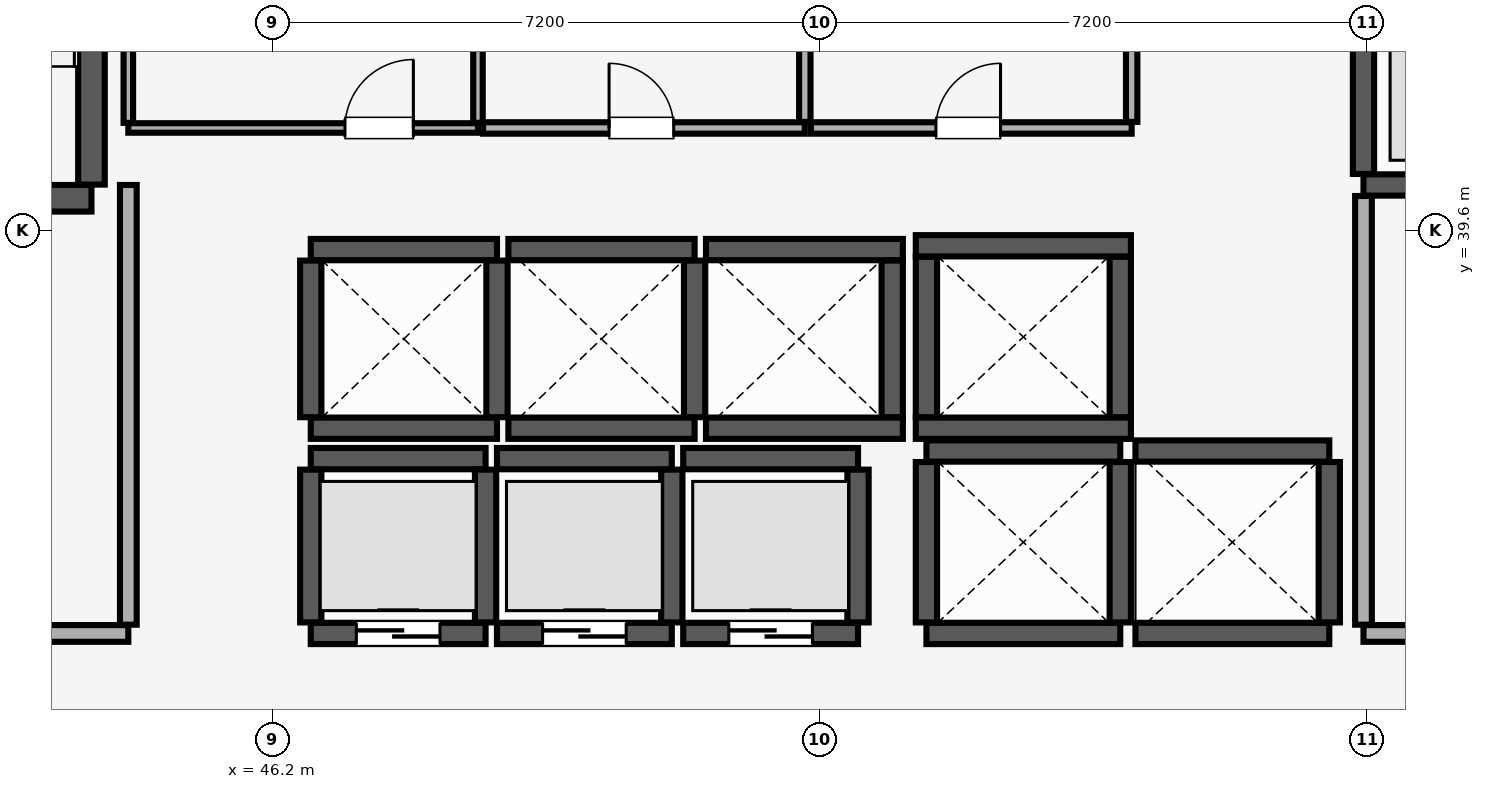
"""IFC4 building model, lengths in metres.
Left out: names, types, materials, properties, quantities, classifications, styles, units other than length and angle.
Written with IfcOpenShell. Run it as: python <this file> out.ifc"""

import sys

from ifc_helpers import new_model, si_unit, direction, frame, frame_2d, origin, place, context, subcontext, project, spatial, rectangle, extrude, element, fill, save


model = new_model("IFC4")
c1 = context("Model", 3, precision=1e-05, world=origin(), true_north=direction((0.0, 1.0)))
c2 = subcontext(c1, "Body", "Model", "MODEL_VIEW")
j1 = project(units=[si_unit("LENGTHUNIT", "METRE"), si_unit("PLANEANGLEUNIT", "RADIAN")], contexts=[c1])
p1 = place(None, origin())
s1 = spatial("IfcSite", under=j1, at=p1, CompositionType="ELEMENT")
p2 = place(p1, origin())
s2 = spatial("IfcBuilding", under=s1, at=p2, CompositionType="ELEMENT")
p3 = place(p2, frame((0.0, 0.0, 135.35)))
s3 = spatial("IfcBuildingStorey", under=s2, at=p3, CompositionType="ELEMENT", Elevation=135.35)
p4 = place(p3, frame((40.185, 40.025, 0.0), z_axis=(0.0, 0.0, 1.0), x_axis=(1.0, 0.0, 0.0)))
e1 = element("IfcWall", 1, at=p4, inside=s3, PredefinedType="SHEAR", context=c2, shape_type="SweptSolid", body=[
    extrude(rectangle(XDim=3.63, YDim=0.35, at=frame_2d((1.815, 0.0))), origin(), (0.0, 0.0, 1.0), 3.56),
])
p5 = place(p4, frame((1.24, 0.0, 0.0)))
e2 = element("IfcOpeningElement", 2, at=p5, cuts=e1, PredefinedType="OPENING", context=c2, shape_type="SweptSolid", body=[
    extrude(rectangle(XDim=1.15, YDim=2.15, at=frame_2d((0.575, 1.075))), frame((0.0, 0.185, 0.0), z_axis=(0.0, -1.0, 0.0), x_axis=(1.0, 0.0, 0.0)), (0.0, 0.0, 1.0), 0.37),
])
p6 = place(p3, frame((43.815, 40.205, 0.0), z_axis=(0.0, 0.0, 1.0), x_axis=(0.0, 1.0, 0.0)))
e3 = element("IfcWall", 3, at=p6, inside=s3, PredefinedType="SHEAR", context=c2, shape_type="SweptSolid", body=[
    extrude(rectangle(XDim=8.09, YDim=0.35, at=frame_2d((4.045, 0.0))), origin(), (0.0, 0.0, 1.0), 3.56),
])
p7 = place(p3, frame((46.7, 34.3, 0.0), z_axis=(0.0, 0.0, 1.0), x_axis=(1.0, 0.0, 0.0)))
e4 = element("IfcWall", 4, at=p7, inside=s3, PredefinedType="SHEAR", context=c2, shape_type="SweptSolid", body=[
    extrude(rectangle(XDim=2.3, YDim=0.28, at=frame_2d((1.15, 0.0))), origin(), (0.0, 0.0, 1.0), 3.56),
])
p8 = place(p7, frame((0.6, 0.0, 0.0)))
e5 = element("IfcOpeningElement", 5, at=p8, cuts=e4, PredefinedType="OPENING", context=c2, shape_type="SweptSolid", body=[
    extrude(rectangle(XDim=1.1, YDim=2.2, at=frame_2d((0.55, 1.1))), frame((0.0, 0.15, 0.0), z_axis=(0.0, -1.0, 0.0), x_axis=(1.0, 0.0, 0.0)), (0.0, 0.0, 1.0), 0.3),
])
p9 = place(p3, frame((46.7, 36.6, 0.0), z_axis=(0.0, 0.0, 1.0), x_axis=(1.0, 0.0, 0.0)))
e6 = element("IfcWall", 6, at=p9, inside=s3, PredefinedType="SHEAR", context=c2, shape_type="SweptSolid", body=[
    extrude(rectangle(XDim=2.3, YDim=0.28, at=frame_2d((1.15, 0.0))), origin(), (0.0, 0.0, 1.0), 3.56),
])
for number, where, z_axis, x_axis in (
    (7, (46.7, 34.445, 0.0), (0.0, 0.0, 1.0), (0.0, 1.0, 0.0)),
    (8, (49.0, 34.445, 0.0), (0.0, 0.0, 1.0), (0.0, 1.0, 0.0)),
):
    element("IfcWall", number, at=place(p3, frame(where, z_axis=z_axis, x_axis=x_axis)), inside=s3, PredefinedType="SHEAR", context=c2, shape_type="SweptSolid", body=[
        extrude(rectangle(XDim=2.01, YDim=0.28, at=frame_2d((1.005, 0.0))), origin(), (0.0, 0.0, 1.0), 3.56),
    ])
p10 = place(p3, frame((49.15, 34.3, 0.0), z_axis=(0.0, 0.0, 1.0), x_axis=(1.0, 0.0, 0.0)))
e9 = element("IfcWall", 9, at=p10, inside=s3, PredefinedType="SHEAR", context=c2, shape_type="SweptSolid", body=[
    extrude(rectangle(XDim=2.3, YDim=0.28, at=frame_2d((1.15, 0.0))), origin(), (0.0, 0.0, 1.0), 3.56),
])
p11 = place(p10, frame((0.6, 0.0, 0.0)))
e10 = element("IfcOpeningElement", 10, at=p11, cuts=e9, PredefinedType="OPENING", context=c2, shape_type="SweptSolid", body=[
    extrude(rectangle(XDim=1.1, YDim=2.2, at=frame_2d((0.55, 1.1))), frame((0.0, 0.15, 0.0), z_axis=(0.0, -1.0, 0.0), x_axis=(1.0, 0.0, 0.0)), (0.0, 0.0, 1.0), 0.3),
])
p12 = place(p3, frame((49.15, 36.6, 0.0), z_axis=(0.0, 0.0, 1.0), x_axis=(1.0, 0.0, 0.0)))
e11 = element("IfcWall", 11, at=p12, inside=s3, PredefinedType="SHEAR", context=c2, shape_type="SweptSolid", body=[
    extrude(rectangle(XDim=2.3, YDim=0.28, at=frame_2d((1.15, 0.0))), origin(), (0.0, 0.0, 1.0), 3.56),
])
p13 = place(p3, frame((51.45, 34.445, 0.0), z_axis=(0.0, 0.0, 1.0), x_axis=(0.0, 1.0, 0.0)))
e12 = element("IfcWall", 12, at=p13, inside=s3, PredefinedType="SHEAR", context=c2, shape_type="SweptSolid", body=[
    extrude(rectangle(XDim=2.01, YDim=0.28, at=frame_2d((1.005, 0.0))), origin(), (0.0, 0.0, 1.0), 3.56),
])
p14 = place(p3, frame((51.6, 34.3, 0.0), z_axis=(0.0, 0.0, 1.0), x_axis=(1.0, 0.0, 0.0)))
e13 = element("IfcWall", 13, at=p14, inside=s3, PredefinedType="SHEAR", context=c2, shape_type="SweptSolid", body=[
    extrude(rectangle(XDim=2.3, YDim=0.28, at=frame_2d((1.15, 0.0))), origin(), (0.0, 0.0, 1.0), 3.56),
])
p15 = place(p14, frame((0.6, 0.0, 0.0)))
e14 = element("IfcOpeningElement", 14, at=p15, cuts=e13, PredefinedType="OPENING", context=c2, shape_type="SweptSolid", body=[
    extrude(rectangle(XDim=1.1, YDim=2.2, at=frame_2d((0.55, 1.1))), frame((0.0, 0.15, 0.0), z_axis=(0.0, -1.0, 0.0), x_axis=(1.0, 0.0, 0.0)), (0.0, 0.0, 1.0), 0.3),
])
p16 = place(p3, frame((51.6, 36.6, 0.0), z_axis=(0.0, 0.0, 1.0), x_axis=(1.0, 0.0, 0.0)))
e15 = element("IfcWall", 15, at=p16, inside=s3, PredefinedType="SHEAR", context=c2, shape_type="SweptSolid", body=[
    extrude(rectangle(XDim=2.3, YDim=0.28, at=frame_2d((1.15, 0.0))), origin(), (0.0, 0.0, 1.0), 3.56),
])
p17 = place(p3, frame((53.9, 34.445, 0.0), z_axis=(0.0, 0.0, 1.0), x_axis=(0.0, 1.0, 0.0)))
e16 = element("IfcWall", 16, at=p17, inside=s3, PredefinedType="SHEAR", context=c2, shape_type="SweptSolid", body=[
    extrude(rectangle(XDim=2.01, YDim=0.28, at=frame_2d((1.005, 0.0))), origin(), (0.0, 0.0, 1.0), 3.56),
])
for number, where, z_axis, x_axis in (
    (17, (46.7, 37.0, 0.0), (0.0, 0.0, 1.0), (1.0, 0.0, 0.0)),
    (18, (46.7, 39.35, 0.0), (0.0, 0.0, 1.0), (1.0, 0.0, 0.0)),
):
    element("IfcWall", number, at=place(p3, frame(where, z_axis=z_axis, x_axis=x_axis)), inside=s3, PredefinedType="SHEAR", context=c2, shape_type="SweptSolid", body=[
        extrude(rectangle(XDim=2.45, YDim=0.28, at=frame_2d((1.225, 0.0))), origin(), (0.0, 0.0, 1.0), 3.56),
    ])
for number, where, z_axis, x_axis in (
    (19, (46.7, 37.145, 0.0), (0.0, 0.0, 1.0), (0.0, 1.0, 0.0)),
    (20, (49.15, 37.145, 0.0), (0.0, 0.0, 1.0), (0.0, 1.0, 0.0)),
):
    element("IfcWall", number, at=place(p3, frame(where, z_axis=z_axis, x_axis=x_axis)), inside=s3, PredefinedType="SHEAR", context=c2, shape_type="SweptSolid", body=[
        extrude(rectangle(XDim=2.06, YDim=0.28, at=frame_2d((1.03, 0.0))), origin(), (0.0, 0.0, 1.0), 3.56),
    ])
for number, where, z_axis, x_axis in (
    (21, (49.3, 37.0, 0.0), (0.0, 0.0, 1.0), (1.0, 0.0, 0.0)),
    (22, (49.3, 39.35, 0.0), (0.0, 0.0, 1.0), (1.0, 0.0, 0.0)),
):
    element("IfcWall", number, at=place(p3, frame(where, z_axis=z_axis, x_axis=x_axis)), inside=s3, PredefinedType="SHEAR", context=c2, shape_type="SweptSolid", body=[
        extrude(rectangle(XDim=2.45, YDim=0.28, at=frame_2d((1.225, 0.0))), origin(), (0.0, 0.0, 1.0), 3.56),
    ])
p18 = place(p3, frame((51.75, 37.145, 0.0), z_axis=(0.0, 0.0, 1.0), x_axis=(0.0, 1.0, 0.0)))
e23 = element("IfcWall", 23, at=p18, inside=s3, PredefinedType="SHEAR", context=c2, shape_type="SweptSolid", body=[
    extrude(rectangle(XDim=2.06, YDim=0.28, at=frame_2d((1.03, 0.0))), origin(), (0.0, 0.0, 1.0), 3.56),
])
for number, where, z_axis, x_axis in (
    (24, (51.9, 37.0, 0.0), (0.0, 0.0, 1.0), (1.0, 0.0, 0.0)),
    (25, (51.9, 39.35, 0.0), (0.0, 0.0, 1.0), (1.0, 0.0, 0.0)),
):
    element("IfcWall", number, at=place(p3, frame(where, z_axis=z_axis, x_axis=x_axis)), inside=s3, PredefinedType="SHEAR", context=c2, shape_type="SweptSolid", body=[
        extrude(rectangle(XDim=2.59, YDim=0.28, at=frame_2d((1.295, 0.0))), origin(), (0.0, 0.0, 1.0), 3.56),
    ])
p19 = place(p3, frame((54.35, 37.145, 0.0), z_axis=(0.0, 0.0, 1.0), x_axis=(0.0, 1.0, 0.0)))
e26 = element("IfcWall", 26, at=p19, inside=s3, PredefinedType="SHEAR", context=c2, shape_type="SweptSolid", body=[
    extrude(rectangle(XDim=2.06, YDim=0.28, at=frame_2d((1.03, 0.0))), origin(), (0.0, 0.0, 1.0), 3.56),
])
for number, where, z_axis, x_axis in (
    (27, (54.8, 34.3, 0.0), (0.0, 0.0, 1.0), (1.0, 0.0, 0.0)),
    (28, (54.8, 36.7, 0.0), (0.0, 0.0, 1.0), (1.0, 0.0, 0.0)),
):
    element("IfcWall", number, at=place(p3, frame(where, z_axis=z_axis, x_axis=x_axis)), inside=s3, PredefinedType="SHEAR", context=c2, shape_type="SweptSolid", body=[
        extrude(rectangle(XDim=2.55, YDim=0.28, at=frame_2d((1.275, 0.0))), origin(), (0.0, 0.0, 1.0), 3.56),
    ])
for number, where, z_axis, x_axis in (
    (29, (54.8, 34.445, 0.0), (0.0, 0.0, 1.0), (0.0, 1.0, 0.0)),
    (30, (57.35, 34.445, 0.0), (0.0, 0.0, 1.0), (0.0, 1.0, 0.0)),
):
    element("IfcWall", number, at=place(p3, frame(where, z_axis=z_axis, x_axis=x_axis)), inside=s3, PredefinedType="SHEAR", context=c2, shape_type="SweptSolid", body=[
        extrude(rectangle(XDim=2.11, YDim=0.28, at=frame_2d((1.055, 0.0))), origin(), (0.0, 0.0, 1.0), 3.56),
    ])
for number, where, z_axis, x_axis in (
    (31, (57.55, 34.3, 0.0), (0.0, 0.0, 1.0), (1.0, 0.0, 0.0)),
    (32, (57.55, 36.7, 0.0), (0.0, 0.0, 1.0), (1.0, 0.0, 0.0)),
):
    element("IfcWall", number, at=place(p3, frame(where, z_axis=z_axis, x_axis=x_axis)), inside=s3, PredefinedType="SHEAR", context=c2, shape_type="SweptSolid", body=[
        extrude(rectangle(XDim=2.55, YDim=0.28, at=frame_2d((1.275, 0.0))), origin(), (0.0, 0.0, 1.0), 3.56),
    ])
p20 = place(p3, frame((60.1, 34.445, 0.0), z_axis=(0.0, 0.0, 1.0), x_axis=(0.0, 1.0, 0.0)))
e33 = element("IfcWall", 33, at=p20, inside=s3, PredefinedType="SHEAR", context=c2, shape_type="SweptSolid", body=[
    extrude(rectangle(XDim=2.11, YDim=0.28, at=frame_2d((1.055, 0.0))), origin(), (0.0, 0.0, 1.0), 3.56),
])
for number, where, z_axis, x_axis in (
    (34, (54.66, 37.0, 0.0), (0.0, 0.0, 1.0), (1.0, 0.0, 0.0)),
    (35, (54.66, 39.4, 0.0), (0.0, 0.0, 1.0), (1.0, 0.0, 0.0)),
):
    element("IfcWall", number, at=place(p3, frame(where, z_axis=z_axis, x_axis=x_axis)), inside=s3, PredefinedType="SHEAR", context=c2, shape_type="SweptSolid", body=[
        extrude(rectangle(XDim=2.83, YDim=0.28, at=frame_2d((1.415, 0.0))), origin(), (0.0, 0.0, 1.0), 3.56),
    ])
for number, where, z_axis, x_axis in (
    (36, (54.8, 37.145, 0.0), (0.0, 0.0, 1.0), (0.0, 1.0, 0.0)),
    (37, (57.35, 37.145, 0.0), (0.0, 0.0, 1.0), (0.0, 1.0, 0.0)),
):
    element("IfcWall", number, at=place(p3, frame(where, z_axis=z_axis, x_axis=x_axis)), inside=s3, PredefinedType="SHEAR", context=c2, shape_type="SweptSolid", body=[
        extrude(rectangle(XDim=2.11, YDim=0.28, at=frame_2d((1.055, 0.0))), origin(), (0.0, 0.0, 1.0), 3.56),
    ])
p21 = place(p3, frame((60.55, 40.2, 0.0), z_axis=(0.0, 0.0, 1.0), x_axis=(1.0, 0.0, 0.0)))
e38 = element("IfcWall", 38, at=p21, inside=s3, PredefinedType="SHEAR", context=c2, shape_type="SweptSolid", body=[
    extrude(rectangle(XDim=2.415, YDim=0.28, at=frame_2d((1.208, 0.0))), origin(), (0.0, 0.0, 1.0), 3.56),
])
p22 = place(p21, frame((0.575, 0.0, 0.0)))
e39 = element("IfcOpeningElement", 39, at=p22, cuts=e38, PredefinedType="OPENING", context=c2, shape_type="SweptSolid", body=[
    extrude(rectangle(XDim=1.3, YDim=2.3, at=frame_2d((0.65, 1.15))), frame((0.0, 0.15, 0.0), z_axis=(0.0, -1.0, 0.0), x_axis=(1.0, 0.0, 0.0)), (0.0, 0.0, 1.0), 0.3),
])
p23 = place(p3, frame((60.55, 40.345, 0.0), z_axis=(0.0, 0.0, 1.0), x_axis=(0.0, 1.0, 0.0)))
e40 = element("IfcWall", 40, at=p23, inside=s3, PredefinedType="SHEAR", context=c2, shape_type="SweptSolid", body=[
    extrude(rectangle(XDim=2.81, YDim=0.28, at=frame_2d((1.405, 0.0))), origin(), (0.0, 0.0, 1.0), 3.56),
])
p24 = place(p3, frame((60.55, 34.3, 0.0), z_axis=(0.0, 0.0, 1.0), x_axis=(1.0, 0.0, 0.0)))
e41 = element("IfcWall", 41, at=p24, inside=s3, PredefinedType="PARTITIONING", context=c2, shape_type="SweptSolid", body=[
    extrude(rectangle(XDim=6.05, YDim=0.22, at=frame_2d((3.025, 0.0))), origin(), (0.0, 0.0, 1.0), 3.56),
])
p25 = place(p24, frame((2.65, 0.0, 0.0)))
e42 = element("IfcOpeningElement", 42, at=p25, cuts=e41, PredefinedType="OPENING", context=c2, shape_type="SweptSolid", body=[
    extrude(rectangle(XDim=1.2, YDim=2.15, at=frame_2d((0.6, 1.075))), frame((0.0, 0.12, 0.0), z_axis=(0.0, -1.0, 0.0), x_axis=(1.0, 0.0, 0.0)), (0.0, 0.0, 1.0), 0.24),
])
p26 = place(p3, frame((60.55, 34.415, 0.0), z_axis=(0.0, 0.0, 1.0), x_axis=(0.0, 1.0, 0.0)))
e43 = element("IfcWall", 43, at=p26, inside=s3, PredefinedType="PARTITIONING", context=c2, shape_type="SweptSolid", body=[
    extrude(rectangle(XDim=5.64, YDim=0.22, at=frame_2d((2.82, 0.0))), origin(), (0.0, 0.0, 1.0), 3.56),
])
p27 = place(p3, frame((39.7, 34.3, 0.0), z_axis=(0.0, 0.0, 1.0), x_axis=(1.0, 0.0, 0.0)))
e44 = element("IfcWall", 44, at=p27, inside=s3, PredefinedType="PARTITIONING", context=c2, shape_type="SweptSolid", body=[
    extrude(rectangle(XDim=4.6, YDim=0.22, at=frame_2d((2.3, 0.0))), origin(), (0.0, 0.0, 1.0), 3.56),
])
p28 = place(p27, frame((1.7, 0.0, 0.0)))
e45 = element("IfcOpeningElement", 45, at=p28, cuts=e44, PredefinedType="OPENING", context=c2, shape_type="SweptSolid", body=[
    extrude(rectangle(XDim=1.2, YDim=2.15, at=frame_2d((0.6, 1.075))), frame((0.0, 0.12, 0.0), z_axis=(0.0, -1.0, 0.0), x_axis=(1.0, 0.0, 0.0)), (0.0, 0.0, 1.0), 0.24),
])
p29 = place(p3, frame((44.3, 34.415, 0.0), z_axis=(0.0, 0.0, 1.0), x_axis=(0.0, 1.0, 0.0)))
e46 = element("IfcWall", 46, at=p29, inside=s3, PredefinedType="PARTITIONING", context=c2, shape_type="SweptSolid", body=[
    extrude(rectangle(XDim=5.785, YDim=0.22, at=frame_2d((2.893, 0.0))), origin(), (0.0, 0.0, 1.0), 3.56),
])
p30 = place(p3, frame((44.3, 40.95, 0.0), z_axis=(0.0, 0.0, 1.0), x_axis=(1.0, 0.0, 0.0)))
e47 = element("IfcWall", 47, at=p30, inside=s3, PredefinedType="PARTITIONING", context=c2, shape_type="SweptSolid", body=[
    extrude(rectangle(XDim=4.6, YDim=0.125, at=frame_2d((2.3, 0.0))), origin(), (0.0, 0.0, 1.0), 3.56),
])
p31 = place(p30, frame((2.85, 0.0, 0.0)))
e48 = element("IfcOpeningElement", 48, at=p31, cuts=e47, PredefinedType="OPENING", context=c2, shape_type="SweptSolid", body=[
    extrude(rectangle(XDim=0.9, YDim=2.1, at=frame_2d((0.45, 1.05))), frame((0.0, 0.073, 0.0), z_axis=(0.0, -1.0, 0.0), x_axis=(1.0, 0.0, 0.0)), (0.0, 0.0, 1.0), 0.145),
])
for number, where, z_axis, x_axis in (
    (49, (44.3, 41.018, 0.0), (0.0, 0.0, 1.0), (0.0, 1.0, 0.0)),
    (50, (48.9, 41.018, 0.0), (0.0, 0.0, 1.0), (0.0, 1.0, 0.0)),
):
    element("IfcWall", number, at=place(p3, frame(where, z_axis=z_axis, x_axis=x_axis)), inside=s3, PredefinedType="PARTITIONING", context=c2, shape_type="SweptSolid", body=[
        extrude(rectangle(XDim=3.515, YDim=0.125, at=frame_2d((1.757, 0.0))), origin(), (0.0, 0.0, 1.0), 3.56),
    ])
p32 = place(p3, frame((48.968, 40.95, 0.0), z_axis=(0.0, 0.0, 1.0), x_axis=(1.0, 0.0, 0.0)))
e51 = element("IfcWall", 51, at=p32, inside=s3, PredefinedType="PARTITIONING", context=c2, shape_type="SweptSolid", body=[
    extrude(rectangle(XDim=4.232, YDim=0.15, at=frame_2d((2.116, 0.0))), origin(), (0.0, 0.0, 1.0), 3.56),
])
p33 = place(p32, frame((1.657, 0.0, 0.0)))
e52 = element("IfcOpeningElement", 52, at=p33, cuts=e51, PredefinedType="OPENING", context=c2, shape_type="SweptSolid", body=[
    extrude(rectangle(XDim=0.85, YDim=2.1, at=frame_2d((0.425, 1.05))), frame((0.0, 0.085, 0.0), z_axis=(0.0, -1.0, 0.0), x_axis=(1.0, 0.0, 0.0)), (0.0, 0.0, 1.0), 0.17),
])
p34 = place(p3, frame((53.2, 41.03, 0.0), z_axis=(0.0, 0.0, 1.0), x_axis=(0.0, 1.0, 0.0)))
e53 = element("IfcWall", 53, at=p34, inside=s3, PredefinedType="PARTITIONING", context=c2, shape_type="SweptSolid", body=[
    extrude(rectangle(XDim=7.82, YDim=0.15, at=frame_2d((3.91, 0.0))), origin(), (0.0, 0.0, 1.0), 3.56),
])
p35 = place(p3, frame((53.28, 40.95, 0.0), z_axis=(0.0, 0.0, 1.0), x_axis=(1.0, 0.0, 0.0)))
e54 = element("IfcWall", 54, at=p35, inside=s3, PredefinedType="PARTITIONING", context=c2, shape_type="SweptSolid", body=[
    extrude(rectangle(XDim=4.22, YDim=0.15, at=frame_2d((2.11, 0.0))), origin(), (0.0, 0.0, 1.0), 3.56),
])
p36 = place(p35, frame((1.645, 0.0, 0.0)))
e55 = element("IfcOpeningElement", 55, at=p36, cuts=e54, PredefinedType="OPENING", context=c2, shape_type="SweptSolid", body=[
    extrude(rectangle(XDim=0.85, YDim=2.1, at=frame_2d((0.425, 1.05))), frame((0.0, 0.085, 0.0), z_axis=(0.0, -1.0, 0.0), x_axis=(1.0, 0.0, 0.0)), (0.0, 0.0, 1.0), 0.17),
])
p37 = place(p3, frame((57.5, 41.03, 0.0), z_axis=(0.0, 0.0, 1.0), x_axis=(0.0, 1.0, 0.0)))
e56 = element("IfcWall", 56, at=p37, inside=s3, PredefinedType="PARTITIONING", context=c2, shape_type="SweptSolid", body=[
    extrude(rectangle(XDim=2.155, YDim=0.15, at=frame_2d((1.078, 0.0))), origin(), (0.0, 0.0, 1.0), 3.56),
])
p38 = place(p8, origin())
e57 = element("IfcDoor", 57, at=p38, inside=s3, OperationType="DOUBLE_DOOR_SLIDING", PredefinedType="DOOR", context=c2, shape_type="SweptSolid", body=[
    extrude(rectangle(XDim=1.1, YDim=2.2, at=frame_2d((0.55, 1.1))), frame((0.0, 0.025, 0.0), z_axis=(0.0, -1.0, 0.0), x_axis=(1.0, 0.0, 0.0)), (0.0, 0.0, 1.0), 0.05),
])
fill(e5, e57)
p39 = place(p11, origin())
e58 = element("IfcDoor", 58, at=p39, inside=s3, OperationType="DOUBLE_DOOR_SLIDING", PredefinedType="DOOR", context=c2, shape_type="SweptSolid", body=[
    extrude(rectangle(XDim=1.1, YDim=2.2, at=frame_2d((0.55, 1.1))), frame((0.0, 0.025, 0.0), z_axis=(0.0, -1.0, 0.0), x_axis=(1.0, 0.0, 0.0)), (0.0, 0.0, 1.0), 0.05),
])
fill(e10, e58)
p40 = place(p15, origin())
e59 = element("IfcDoor", 59, at=p40, inside=s3, OperationType="DOUBLE_DOOR_SLIDING", PredefinedType="DOOR", context=c2, shape_type="SweptSolid", body=[
    extrude(rectangle(XDim=1.1, YDim=2.2, at=frame_2d((0.55, 1.1))), frame((0.0, 0.025, 0.0), z_axis=(0.0, -1.0, 0.0), x_axis=(1.0, 0.0, 0.0)), (0.0, 0.0, 1.0), 0.05),
])
fill(e14, e59)
p41 = place(p31, origin())
e60 = element("IfcDoor", 60, at=p41, inside=s3, OperationType="SINGLE_SWING_RIGHT", PredefinedType="DOOR", context=c2, shape_type="SweptSolid", body=[
    extrude(rectangle(XDim=0.9, YDim=2.1, at=frame_2d((0.45, 1.05))), frame((0.0, 0.025, 0.0), z_axis=(0.0, -1.0, 0.0), x_axis=(1.0, 0.0, 0.0)), (0.0, 0.0, 1.0), 0.05),
])
fill(e48, e60)
p42 = place(p33, origin())
e61 = element("IfcDoor", 61, at=p42, inside=s3, OperationType="SINGLE_SWING_LEFT", PredefinedType="DOOR", context=c2, shape_type="SweptSolid", body=[
    extrude(rectangle(XDim=0.85, YDim=2.1, at=frame_2d((0.425, 1.05))), frame((0.0, 0.025, 0.0), z_axis=(0.0, -1.0, 0.0), x_axis=(1.0, 0.0, 0.0)), (0.0, 0.0, 1.0), 0.05),
])
fill(e52, e61)
p43 = place(p36, origin())
e62 = element("IfcDoor", 62, at=p43, inside=s3, OperationType="SINGLE_SWING_RIGHT", PredefinedType="DOOR", context=c2, shape_type="SweptSolid", body=[
    extrude(rectangle(XDim=0.85, YDim=2.1, at=frame_2d((0.425, 1.05))), frame((0.0, 0.025, 0.0), z_axis=(0.0, -1.0, 0.0), x_axis=(1.0, 0.0, 0.0)), (0.0, 0.0, 1.0), 0.05),
])
fill(e55, e62)
save(model, sys.argv[1])
